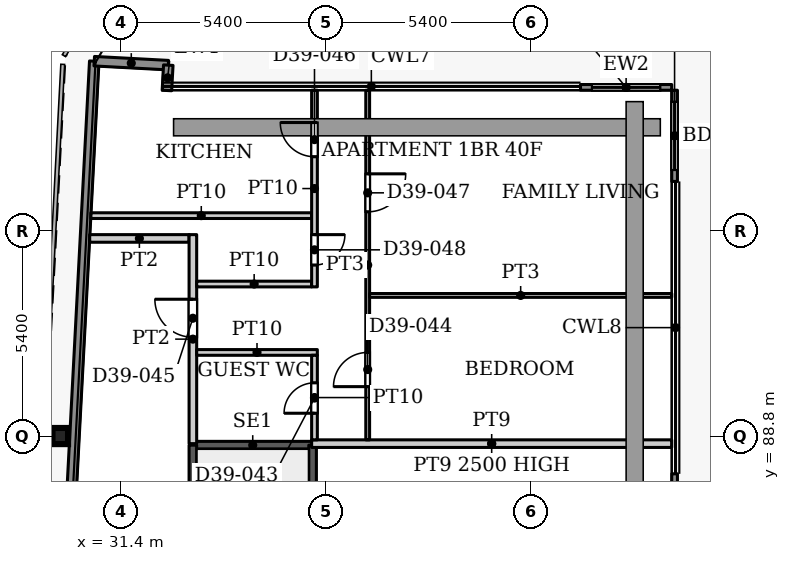
"""IFC4 building model, lengths in metres.
Left out: names, types, materials, properties, quantities, classifications, styles, units other than length and angle.
Written with IfcOpenShell. Run it as: python <this file> out.ifc"""

import sys

from ifc_helpers import new_model, si_unit, direction, frame, frame_2d, origin, origin_2d, place, context, subcontext, project, spatial, rectangle, i_section, extrude, source, transform, mapped, element, fill, save


model = new_model("IFC4")
c1 = context("Model", 3, precision=1e-05, world=origin(), true_north=direction((0.0, 1.0)))
c2 = subcontext(c1, "Body", "Model", "MODEL_VIEW")
j1 = project(units=[si_unit("LENGTHUNIT", "METRE"), si_unit("PLANEANGLEUNIT", "RADIAN")], contexts=[c1])
p1 = place(None, origin())
s1 = spatial("IfcSite", under=j1, at=p1, CompositionType="ELEMENT")
p2 = place(p1, origin())
s2 = spatial("IfcBuilding", under=s1, at=p2, CompositionType="ELEMENT")
p3 = place(p2, frame((0.0, 0.0, 172.1)))
s3 = spatial("IfcBuildingStorey", under=s2, at=p3, CompositionType="ELEMENT", Elevation=172.1)
p4 = place(p3, frame((29.811, 88.8, 0.0), z_axis=(0.0, 0.0, 1.0), x_axis=(1.0, 0.0, 0.0)))
e1 = element("IfcColumn", 1, at=p4, inside=s3, PredefinedType="COLUMN", context=c2, shape_type="SweptSolid", body=[
    extrude(i_section(OverallWidth=0.409, OverallDepth=0.425, WebThickness=0.033, FlangeThickness=0.052, FilletRadius=0.013, at=origin_2d()), origin(), (0.0, 0.0, 1.0), 3.9),
])
p5 = place(p3, frame((27.195, 31.969, 0.0), z_axis=(0.0, 0.0, 1.0), x_axis=(0.052554995867, 0.998618031286, 0.0)))
e2 = element("IfcWall", 2, at=p5, inside=s3, PredefinedType="SOLIDWALL", context=c2, shape_type="SweptSolid", body=[
    extrude(rectangle(XDim=66.787, YDim=0.25, at=frame_2d((33.394, 0.0))), origin(), (0.0, 0.0, 1.0), 3.75),
])
p6 = place(p3, frame((30.705, 98.664, 0.0), z_axis=(0.0, 0.0, 1.0), x_axis=(0.998577785791, -0.053314216913, 0.0)))
e3 = element("IfcWall", 3, at=p6, inside=s3, PredefinedType="SOLIDWALL", context=c2, shape_type="SweptSolid", body=[
    extrude(rectangle(XDim=1.951, YDim=0.25, at=frame_2d((0.975, 0.0))), origin(), (0.0, 0.0, 1.0), 3.75),
])
p7 = place(p3, frame((32.653, 98.56, 0.0), z_axis=(0.0, 0.0, 1.0), x_axis=(-0.054093451632, -0.998535877418, 0.0)))
e4 = element("IfcWall", 4, at=p7, inside=s3, PredefinedType="SOLIDWALL", context=c2, shape_type="SweptSolid", body=[
    extrude(rectangle(XDim=0.668, YDim=0.25, at=frame_2d((0.334, 0.0))), origin(), (0.0, 0.0, 1.0), 3.75),
])
p8 = place(p3, frame((43.5, 97.975, 0.0), z_axis=(0.0, 0.0, 1.0), x_axis=(1.0, 0.0, 0.0)))
e5 = element("IfcWall", 5, at=p8, inside=s3, PredefinedType="SOLIDWALL", context=c2, shape_type="SweptSolid", body=[
    extrude(rectangle(XDim=2.4, YDim=0.15, at=frame_2d((1.2, 0.0))), origin(), (0.0, 0.0, 1.0), 3.75),
])
p9 = place(p8, frame((0.3, 0.0, 0.0)))
e6 = element("IfcOpeningElement", 6, at=p9, cuts=e5, PredefinedType="OPENING", context=c2, shape_type="SweptSolid", body=[
    extrude(rectangle(XDim=1.8, YDim=2.4, at=frame_2d((0.9, 1.2))), frame((0.0, 0.085, 0.0), z_axis=(0.0, -1.0, 0.0), x_axis=(1.0, 0.0, 0.0)), (0.0, 0.0, 1.0), 0.17),
])
p10 = place(p3, frame((45.975, 97.9, 0.0), z_axis=(0.0, 0.0, 1.0), x_axis=(0.0, -1.0, 0.0)))
e7 = element("IfcWall", 7, at=p10, inside=s3, PredefinedType="SOLIDWALL", context=c2, shape_type="SweptSolid", body=[
    extrude(rectangle(XDim=2.4, YDim=0.15, at=frame_2d((1.2, 0.0))), origin(), (0.0, 0.0, 1.0), 3.75),
])
p11 = place(p10, frame((0.3, 0.0, 0.0)))
e8 = element("IfcOpeningElement", 8, at=p11, cuts=e7, PredefinedType="OPENING", context=c2, shape_type="SweptSolid", body=[
    extrude(rectangle(XDim=1.8, YDim=2.4, at=frame_2d((0.9, 1.2))), frame((0.0, 0.085, 0.0), z_axis=(0.0, -1.0, 0.0), x_axis=(1.0, 0.0, 0.0)), (0.0, 0.0, 1.0), 0.17),
])
p12 = place(p3, frame((45.975, 87.806, 0.0), z_axis=(0.0, 0.0, 1.0), x_axis=(0.0, -1.0, 0.0)))
e9 = element("IfcWall", 9, at=p12, inside=s3, PredefinedType="SOLIDWALL", context=c2, shape_type="SweptSolid", body=[
    extrude(rectangle(XDim=2.4, YDim=0.15, at=frame_2d((1.2, 0.0))), origin(), (0.0, 0.0, 1.0), 3.75),
])
p13 = place(p12, frame((0.3, 0.0, 0.0)))
e10 = element("IfcOpeningElement", 10, at=p13, cuts=e9, PredefinedType="OPENING", context=c2, shape_type="SweptSolid", body=[
    extrude(rectangle(XDim=1.8, YDim=2.4, at=frame_2d((0.9, 1.2))), frame((0.0, 0.085, 0.0), z_axis=(0.0, -1.0, 0.0), x_axis=(1.0, 0.0, 0.0)), (0.0, 0.0, 1.0), 0.17),
])
p14 = place(p3, frame((33.3, 88.56, 0.0), z_axis=(0.0, 0.0, 1.0), x_axis=(1.0, 0.0, 0.0)))
e11 = element("IfcWall", 11, at=p14, inside=s3, PredefinedType="SHEAR", context=c2, shape_type="SweptSolid", body=[
    extrude(rectangle(XDim=3.15, YDim=0.2, at=frame_2d((1.575, 0.0))), origin(), (0.0, 0.0, 1.0), 3.9),
])
p15 = place(p3, frame((33.3, 79.4, 0.0), z_axis=(0.0, 0.0, 1.0), x_axis=(0.0, 1.0, 0.0)))
e12 = element("IfcWall", 12, at=p15, inside=s3, PredefinedType="SHEAR", context=c2, shape_type="SweptSolid", body=[
    extrude(rectangle(XDim=9.16, YDim=0.2, at=frame_2d((4.58, 0.0))), origin(), (0.0, 0.0, 1.0), 3.9),
])
p16 = place(p15, frame((0.35, 0.0, 0.0)))
e13 = element("IfcOpeningElement", 13, at=p16, cuts=e12, PredefinedType="OPENING", context=c2, shape_type="SweptSolid", body=[
    extrude(rectangle(XDim=1.1, YDim=2.2, at=frame_2d((0.55, 1.1))), frame((0.0, 0.11, 0.0), z_axis=(0.0, -1.0, 0.0), x_axis=(1.0, 0.0, 0.0)), (0.0, 0.0, 1.0), 0.22),
])
p17 = place(p3, frame((36.45, 79.4, 0.0), z_axis=(0.0, 0.0, 1.0), x_axis=(0.0, 1.0, 0.0)))
e14 = element("IfcWall", 14, at=p17, inside=s3, PredefinedType="SHEAR", context=c2, shape_type="SweptSolid", body=[
    extrude(rectangle(XDim=9.16, YDim=0.2, at=frame_2d((4.58, 0.0))), origin(), (0.0, 0.0, 1.0), 3.9),
])
p18 = place(p3, frame((30.617, 94.6, 0.0), z_axis=(0.0, 0.0, 1.0), x_axis=(1.0, 0.0, 0.0)))
e15 = element("IfcWall", 15, at=p18, inside=s3, PredefinedType="PARTITIONING", context=c2, shape_type="SweptSolid", body=[
    extrude(rectangle(XDim=5.808, YDim=0.15, at=frame_2d((2.904, 0.0))), origin(), (0.0, 0.0, 1.0), 3.6),
])
p19 = place(p3, frame((30.585, 94.0, 0.0), z_axis=(0.0, 0.0, 1.0), x_axis=(1.0, 0.0, 0.0)))
e16 = element("IfcWall", 16, at=p19, inside=s3, PredefinedType="PARTITIONING", context=c2, shape_type="SweptSolid", body=[
    extrude(rectangle(XDim=2.615, YDim=0.2, at=frame_2d((1.308, 0.0))), origin(), (0.0, 0.0, 1.0), 3.6),
])
p20 = place(p3, frame((33.3, 88.6, 0.0), z_axis=(0.0, 0.0, 1.0), x_axis=(0.0, 1.0, 0.0)))
e17 = element("IfcWall", 17, at=p20, inside=s3, PredefinedType="PARTITIONING", context=c2, shape_type="SweptSolid", body=[
    extrude(rectangle(XDim=5.5, YDim=0.2, at=frame_2d((2.75, 0.0))), origin(), (0.0, 0.0, 1.0), 3.6),
])
p21 = place(p20, frame((2.8, 0.0, 0.0)))
e18 = element("IfcOpeningElement", 18, at=p21, cuts=e17, PredefinedType="OPENING", context=c2, shape_type="SweptSolid", body=[
    extrude(rectangle(XDim=1.0, YDim=2.1, at=frame_2d((0.5, 1.05))), frame((0.0, 0.11, 0.0), z_axis=(0.0, -1.0, 0.0), x_axis=(1.0, 0.0, 0.0)), (0.0, 0.0, 1.0), 0.22),
])
p22 = place(p3, frame((33.4, 91.0, 0.0), z_axis=(0.0, 0.0, 1.0), x_axis=(1.0, 0.0, 0.0)))
e19 = element("IfcWall", 19, at=p22, inside=s3, PredefinedType="PARTITIONING", context=c2, shape_type="SweptSolid", body=[
    extrude(rectangle(XDim=3.175, YDim=0.15, at=frame_2d((1.587, 0.0))), origin(), (0.0, 0.0, 1.0), 3.6),
])
p23 = place(p3, frame((33.4, 92.8, 0.0), z_axis=(0.0, 0.0, 1.0), x_axis=(1.0, 0.0, 0.0)))
e20 = element("IfcWall", 20, at=p23, inside=s3, PredefinedType="PARTITIONING", context=c2, shape_type="SweptSolid", body=[
    extrude(rectangle(XDim=3.025, YDim=0.15, at=frame_2d((1.513, 0.0))), origin(), (0.0, 0.0, 1.0), 3.6),
])
p24 = place(p3, frame((36.425, 88.6, 0.0), z_axis=(0.0, 0.0, 1.0), x_axis=(1.0, 0.0, 0.0)))
e21 = element("IfcWall", 21, at=p24, inside=s3, PredefinedType="PARTITIONING", context=c2, shape_type="SweptSolid", body=[
    extrude(rectangle(XDim=9.475, YDim=0.2, at=frame_2d((4.737, 0.0))), origin(), (0.0, 0.0, 1.0), 2.5),
])
p25 = place(p3, frame((36.5, 88.7, 0.0), z_axis=(0.0, 0.0, 1.0), x_axis=(0.0, 1.0, 0.0)))
e22 = element("IfcWall", 22, at=p25, inside=s3, PredefinedType="PARTITIONING", context=c2, shape_type="SweptSolid", body=[
    extrude(rectangle(XDim=2.225, YDim=0.15, at=frame_2d((1.113, 0.0))), origin(), (0.0, 0.0, 1.0), 3.6),
])
p26 = place(p25, frame((0.7, 0.0, 0.0)))
e23 = element("IfcOpeningElement", 23, at=p26, cuts=e22, PredefinedType="OPENING", context=c2, shape_type="SweptSolid", body=[
    extrude(rectangle(XDim=0.8, YDim=2.1, at=frame_2d((0.4, 1.05))), frame((0.0, 0.085, 0.0), z_axis=(0.0, -1.0, 0.0), x_axis=(1.0, 0.0, 0.0)), (0.0, 0.0, 1.0), 0.17),
])
p27 = place(p3, frame((36.5, 92.725, 0.0), z_axis=(0.0, 0.0, 1.0), x_axis=(0.0, 1.0, 0.0)))
e24 = element("IfcWall", 24, at=p27, inside=s3, PredefinedType="PARTITIONING", context=c2, shape_type="SweptSolid", body=[
    extrude(rectangle(XDim=5.175, YDim=0.15, at=frame_2d((2.587, 0.0))), origin(), (0.0, 0.0, 1.0), 3.6),
])
p28 = place(p27, frame((3.425, 0.0, 0.0)))
e25 = element("IfcOpeningElement", 25, at=p28, cuts=e24, PredefinedType="OPENING", context=c2, shape_type="SweptSolid", body=[
    extrude(rectangle(XDim=0.9, YDim=2.1, at=frame_2d((0.45, 1.05))), frame((0.0, 0.085, 0.0), z_axis=(0.0, -1.0, 0.0), x_axis=(1.0, 0.0, 0.0)), (0.0, 0.0, 1.0), 0.17),
])
p29 = place(p27, frame((0.575, 0.0, 0.0)))
e26 = element("IfcOpeningElement", 26, at=p29, cuts=e24, PredefinedType="OPENING", context=c2, shape_type="SweptSolid", body=[
    extrude(rectangle(XDim=0.8, YDim=2.1, at=frame_2d((0.4, 1.05))), frame((0.0, 0.085, 0.0), z_axis=(0.0, -1.0, 0.0), x_axis=(1.0, 0.0, 0.0)), (0.0, 0.0, 1.0), 0.17),
])
p30 = place(p3, frame((37.9, 88.7, 0.0), z_axis=(0.0, 0.0, 1.0), x_axis=(0.0, 1.0, 0.0)))
e27 = element("IfcWall", 27, at=p30, inside=s3, PredefinedType="PARTITIONING", context=c2, shape_type="SweptSolid", body=[
    extrude(rectangle(XDim=9.2, YDim=0.1, at=frame_2d((4.6, 0.0))), origin(), (0.0, 0.0, 1.0), 3.6),
])
p31 = place(p30, frame((1.4, 0.0, 0.0)))
e28 = element("IfcOpeningElement", 28, at=p31, cuts=e27, PredefinedType="OPENING", context=c2, shape_type="SweptSolid", body=[
    extrude(rectangle(XDim=0.9, YDim=2.1, at=frame_2d((0.45, 1.05))), frame((0.0, 0.06, 0.0), z_axis=(0.0, -1.0, 0.0), x_axis=(1.0, 0.0, 0.0)), (0.0, 0.0, 1.0), 0.12),
])
p32 = place(p30, frame((6.0, 0.0, 0.0)))
e29 = element("IfcOpeningElement", 29, at=p32, cuts=e27, PredefinedType="OPENING", context=c2, shape_type="SweptSolid", body=[
    extrude(rectangle(XDim=1.0, YDim=2.1, at=frame_2d((0.5, 1.05))), frame((0.0, 0.06, 0.0), z_axis=(0.0, -1.0, 0.0), x_axis=(1.0, 0.0, 0.0)), (0.0, 0.0, 1.0), 0.12),
])
p33 = place(p3, frame((37.95, 92.5, 0.0), z_axis=(0.0, 0.0, 1.0), x_axis=(1.0, 0.0, 0.0)))
e30 = element("IfcWall", 30, at=p33, inside=s3, PredefinedType="PARTITIONING", context=c2, shape_type="SweptSolid", body=[
    extrude(rectangle(XDim=7.95, YDim=0.1, at=frame_2d((3.975, 0.0))), origin(), (0.0, 0.0, 1.0), 3.6),
])
m1 = source(origin(), c2, "Body", "SweptSolid", [
    extrude(rectangle(XDim=1.8, YDim=2.4, at=frame_2d((0.9, 1.2))), frame((0.0, 0.025, 0.0), z_axis=(0.0, -1.0, 0.0), x_axis=(1.0, 0.0, 0.0)), (0.0, 0.0, 1.0), 0.05),
])
p34 = place(p9, origin())
e31 = element("IfcDoor", 31, at=p34, inside=s3, OperationType="SLIDING_TO_LEFT", PredefinedType="DOOR", context=c2, shape_type="MappedRepresentation", body=[
    mapped(m1, transform((0.0, 0.0, 0.0), x_axis=(1.0, 0.0, 0.0), y_axis=(0.0, 1.0, 0.0), z_axis=(0.0, 0.0, 1.0), scale=1.0)),
])
fill(e6, e31)
p35 = place(p11, origin())
e32 = element("IfcDoor", 32, at=p35, inside=s3, OperationType="SLIDING_TO_LEFT", PredefinedType="DOOR", context=c2, shape_type="MappedRepresentation", body=[
    mapped(m1, transform((0.0, 0.0, 0.0), x_axis=(1.0, 0.0, 0.0), y_axis=(0.0, 1.0, 0.0), z_axis=(0.0, 0.0, 1.0), scale=1.0)),
])
fill(e8, e32)
m2 = source(origin(), c2, "Body", "SweptSolid", [
    extrude(rectangle(XDim=0.8, YDim=2.1, at=frame_2d((0.4, 1.05))), frame((0.0, 0.025, 0.0), z_axis=(0.0, -1.0, 0.0), x_axis=(1.0, 0.0, 0.0)), (0.0, 0.0, 1.0), 0.05),
])
p36 = place(p26, origin())
e33 = element("IfcDoor", 33, at=p36, inside=s3, OperationType="SINGLE_SWING_LEFT", PredefinedType="DOOR", context=c2, shape_type="MappedRepresentation", body=[
    mapped(m2, transform((0.0, 0.0, 0.0), x_axis=(1.0, 0.0, 0.0), y_axis=(0.0, 1.0, 0.0), z_axis=(0.0, 0.0, 1.0), scale=1.0)),
])
fill(e23, e33)
m3 = source(origin(), c2, "Body", "SweptSolid", [
    extrude(rectangle(XDim=0.9, YDim=2.1, at=frame_2d((0.45, 1.05))), frame((0.0, 0.025, 0.0), z_axis=(0.0, -1.0, 0.0), x_axis=(1.0, 0.0, 0.0)), (0.0, 0.0, 1.0), 0.05),
])
p37 = place(p31, origin())
e34 = element("IfcDoor", 34, at=p37, inside=s3, OperationType="SINGLE_SWING_LEFT", PredefinedType="DOOR", context=c2, shape_type="MappedRepresentation", body=[
    mapped(m3, transform((0.0, 0.0, 0.0), x_axis=(1.0, 0.0, 0.0), y_axis=(0.0, 1.0, 0.0), z_axis=(0.0, 0.0, 1.0), scale=1.0)),
])
fill(e28, e34)
m4 = source(origin(), c2, "Body", "SweptSolid", [
    extrude(rectangle(XDim=1.0, YDim=2.1, at=frame_2d((0.5, 1.05))), frame((0.0, 0.025, 0.0), z_axis=(0.0, -1.0, 0.0), x_axis=(1.0, 0.0, 0.0)), (0.0, 0.0, 1.0), 0.05),
])
p38 = place(p21, origin())
e35 = element("IfcDoor", 35, at=p38, inside=s3, OperationType="SINGLE_SWING_LEFT", PredefinedType="DOOR", context=c2, shape_type="MappedRepresentation", body=[
    mapped(m4, transform((0.0, 0.0, 0.0), x_axis=(1.0, 0.0, 0.0), y_axis=(0.0, 1.0, 0.0), z_axis=(0.0, 0.0, 1.0), scale=1.0)),
])
fill(e18, e35)
p39 = place(p28, origin())
e36 = element("IfcDoor", 36, at=p39, inside=s3, OperationType="SINGLE_SWING_LEFT", PredefinedType="DOOR", context=c2, shape_type="MappedRepresentation", body=[
    mapped(m3, transform((0.0, 0.0, 0.0), x_axis=(1.0, 0.0, 0.0), y_axis=(0.0, 1.0, 0.0), z_axis=(0.0, 0.0, 1.0), scale=1.0)),
])
fill(e25, e36)
m5 = source(origin(), c2, "Body", "SweptSolid", [
    extrude(rectangle(XDim=1.0, YDim=2.1, at=frame_2d((0.5, 1.05))), frame((0.0, 0.025, 0.0), z_axis=(0.0, -1.0, 0.0), x_axis=(1.0, 0.0, 0.0)), (0.0, 0.0, 1.0), 0.05),
])
p40 = place(p32, origin())
e37 = element("IfcDoor", 37, at=p40, inside=s3, OperationType="SINGLE_SWING_RIGHT", PredefinedType="DOOR", context=c2, shape_type="MappedRepresentation", body=[
    mapped(m5, transform((0.0, 0.0, 0.0), x_axis=(1.0, 0.0, 0.0), y_axis=(0.0, 1.0, 0.0), z_axis=(0.0, 0.0, 1.0), scale=1.0)),
])
fill(e29, e37)
p41 = place(p29, origin())
e38 = element("IfcDoor", 38, at=p41, inside=s3, OperationType="SINGLE_SWING_RIGHT", PredefinedType="DOOR", context=c2, shape_type="MappedRepresentation", body=[
    mapped(m2, transform((0.0, 0.0, 0.0), x_axis=(1.0, 0.0, 0.0), y_axis=(0.0, 1.0, 0.0), z_axis=(0.0, 0.0, 1.0), scale=1.0)),
])
fill(e26, e38)
save(model, sys.argv[1])
